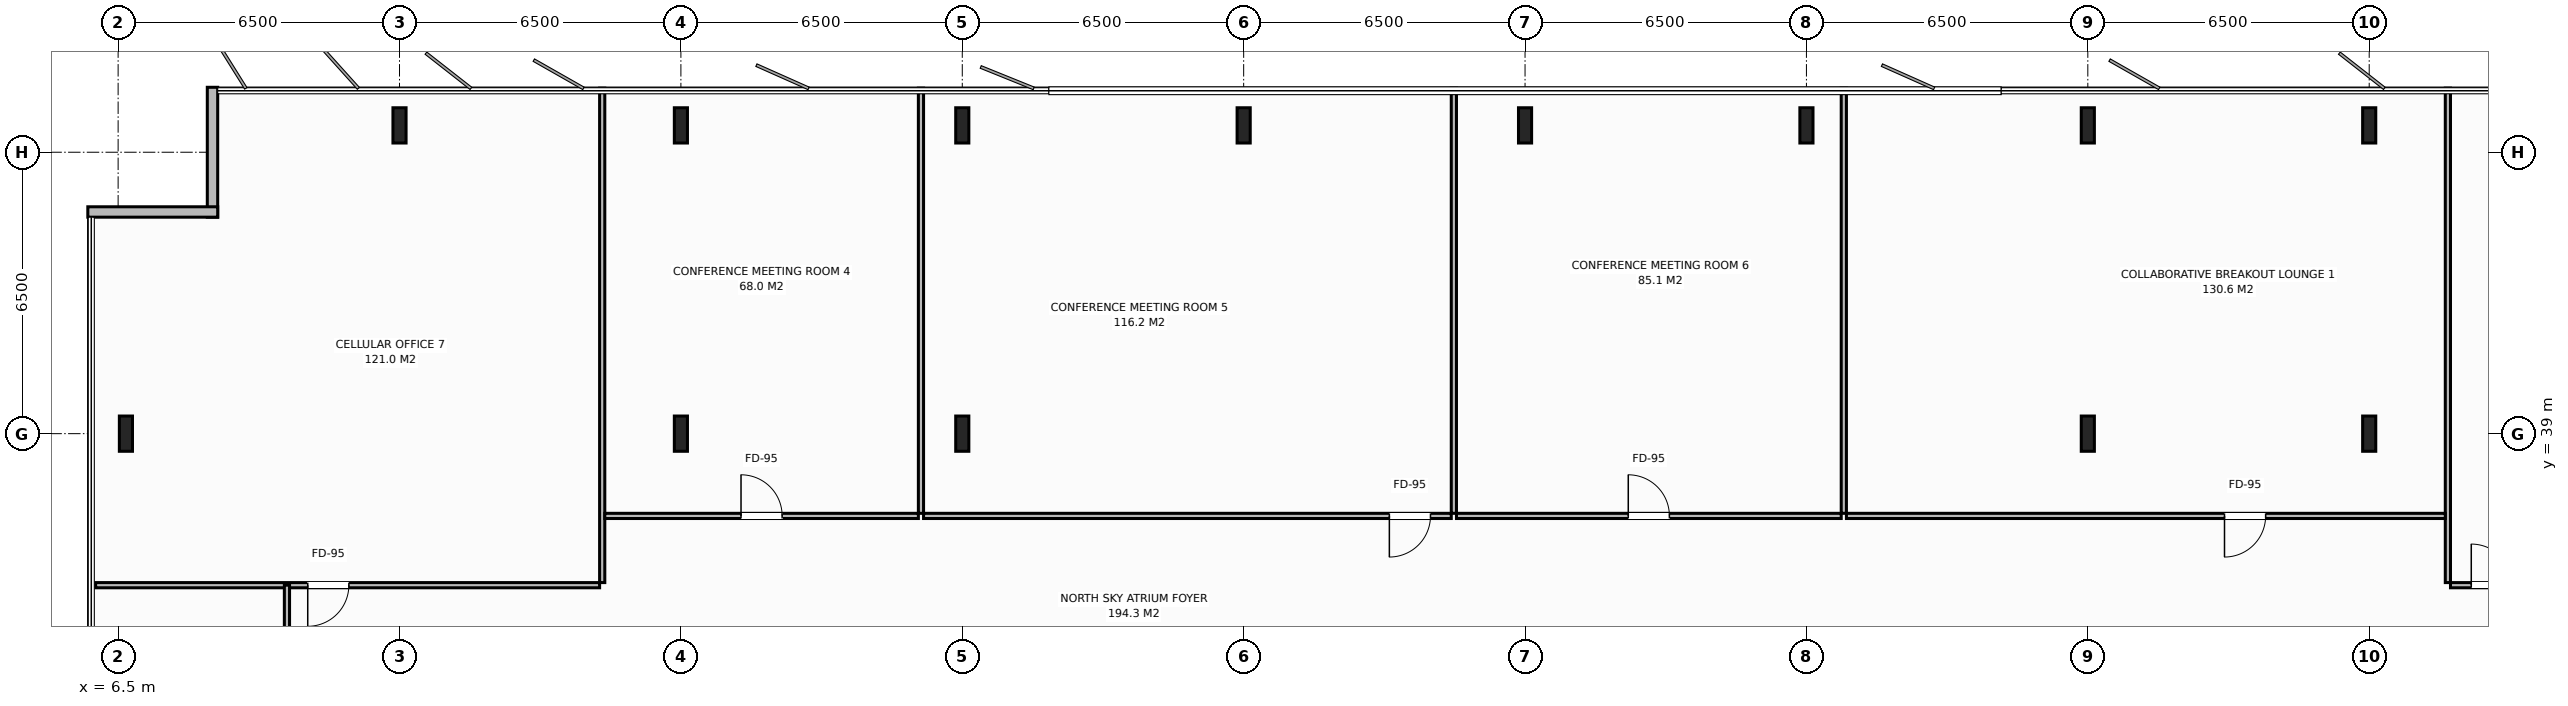
"""IFC4 building model, lengths in metres.
Left out: names, types, materials, properties, quantities, classifications, styles, units other than length and angle.
Written with IfcOpenShell. Run it as: python <this file> out.ifc"""

import sys

from ifc_helpers import new_model, si_unit, direction, frame, frame_2d, origin, origin_2d, place, context, subcontext, project, spatial, rectangle, i_section, extrude, element, fill, save


model = new_model("IFC4")
c1 = context("Model", 3, precision=1e-05, world=origin(), true_north=direction((0.0, 1.0)))
c2 = subcontext(c1, "Body", "Model", "MODEL_VIEW")
j1 = project(units=[si_unit("LENGTHUNIT", "METRE"), si_unit("PLANEANGLEUNIT", "RADIAN")], contexts=[c1])
p1 = place(None, origin())
s1 = spatial("IfcSite", under=j1, at=p1, CompositionType="ELEMENT")
p2 = place(p1, origin())
s2 = spatial("IfcBuilding", under=s1, at=p2, CompositionType="ELEMENT")
p3 = place(p2, frame((0.0, 0.0, 236.6)))
s3 = spatial("IfcBuildingStorey", under=s2, at=p3, CompositionType="ELEMENT", Elevation=236.6)
for number, where, z_axis, x_axis in (
    (1, (19.5, 39.0, 0.0), (0.0, 0.0, 1.0), (1.0, 0.0, 0.0)),
    (2, (58.5, 39.0, 0.0), (0.0, 0.0, 1.0), (1.0, 0.0, 0.0)),
    (3, (26.0, 39.0, 0.0), (0.0, 0.0, 1.0), (1.0, 0.0, 0.0)),
    (4, (52.0, 39.0, 0.0), (0.0, 0.0, 1.0), (1.0, 0.0, 0.0)),
    (5, (13.0, 46.12, 0.0), (0.0, 0.0, 1.0), (1.0, 0.0, 0.0)),
    (6, (19.5, 46.12, 0.0), (0.0, 0.0, 1.0), (1.0, 0.0, 0.0)),
    (7, (26.0, 46.12, 0.0), (0.0, 0.0, 1.0), (1.0, 0.0, 0.0)),
    (8, (32.5, 46.12, 0.0), (0.0, 0.0, 1.0), (1.0, 0.0, 0.0)),
    (9, (39.0, 46.12, 0.0), (0.0, 0.0, 1.0), (1.0, 0.0, 0.0)),
    (10, (45.5, 46.12, 0.0), (0.0, 0.0, 1.0), (1.0, 0.0, 0.0)),
    (11, (52.0, 46.12, 0.0), (0.0, 0.0, 1.0), (1.0, 0.0, 0.0)),
    (12, (58.5, 46.12, 0.0), (0.0, 0.0, 1.0), (1.0, 0.0, 0.0)),
    (13, (6.68, 39.0, 0.0), (0.0, 0.0, 1.0), (1.0, 0.0, 0.0)),
):
    element("IfcColumn", number, at=place(p3, frame(where, z_axis=z_axis, x_axis=x_axis)), inside=s3, PredefinedType="COLUMN", context=c2, shape_type="SweptSolid", body=[
        extrude(i_section(OverallWidth=0.303, OverallDepth=0.814, WebThickness=0.021, FlangeThickness=0.04, at=origin_2d()), origin(), (0.0, 0.0, 1.0), 3.8),
    ])
for number, where, z_axis, x_axis in (
    (14, (8.68, 44.0, 0.0), (0.0, 0.0, 1.0), (0.0, 1.0, 0.0)),
    (15, (5.8, 44.12, 0.0), (0.0, 0.0, 1.0), (1.0, 0.0, 0.0)),
):
    element("IfcWall", number, at=place(p3, frame(where, z_axis=z_axis, x_axis=x_axis)), inside=s3, PredefinedType="STANDARD", context=c2, shape_type="SweptSolid", body=[
        extrude(rectangle(XDim=3.0, YDim=0.24, at=frame_2d((1.5, 0.0))), origin(), (0.0, 0.0, 1.0), 3.58),
    ])
p4 = place(p3, frame((17.682, 35.56, 0.0), z_axis=(0.0, 0.0, 1.0), x_axis=(0.0, 1.0, 0.0)))
e16 = element("IfcWall", 16, at=p4, inside=s3, PredefinedType="PARTITIONING", context=c2, shape_type="SweptSolid", body=[
    extrude(rectangle(XDim=11.42, YDim=0.12, at=frame_2d((5.71, 0.0))), origin(), (0.0, 0.0, 1.0), 3.58),
])
p5 = place(p3, frame((5.98, 35.5, 0.0), z_axis=(0.0, 0.0, 1.0), x_axis=(1.0, 0.0, 0.0)))
e17 = element("IfcWall", 17, at=p5, inside=s3, PredefinedType="PARTITIONING", context=c2, shape_type="SweptSolid", body=[
    extrude(rectangle(XDim=11.642, YDim=0.12, at=frame_2d((5.821, 0.0))), origin(), (0.0, 0.0, 1.0), 3.58),
])
p6 = place(p5, frame((4.9, 0.0, 0.0)))
e18 = element("IfcOpeningElement", 18, at=p6, cuts=e17, PredefinedType="OPENING", context=c2, shape_type="SweptSolid", body=[
    extrude(rectangle(XDim=0.95, YDim=2.15, at=frame_2d((0.475, 1.075))), frame((0.0, 0.07, 0.0), z_axis=(0.0, -1.0, 0.0), x_axis=(1.0, 0.0, 0.0)), (0.0, 0.0, 1.0), 0.14),
])
p7 = place(p3, frame((25.046, 37.16, 0.0), z_axis=(0.0, 0.0, 1.0), x_axis=(0.0, 1.0, 0.0)))
e19 = element("IfcWall", 19, at=p7, inside=s3, PredefinedType="PARTITIONING", context=c2, shape_type="SweptSolid", body=[
    extrude(rectangle(XDim=9.82, YDim=0.12, at=frame_2d((4.91, 0.0))), origin(), (0.0, 0.0, 1.0), 3.58),
])
p8 = place(p3, frame((17.742, 37.1, 0.0), z_axis=(0.0, 0.0, 1.0), x_axis=(1.0, 0.0, 0.0)))
e20 = element("IfcWall", 20, at=p8, inside=s3, PredefinedType="PARTITIONING", context=c2, shape_type="SweptSolid", body=[
    extrude(rectangle(XDim=7.243, YDim=0.12, at=frame_2d((3.622, 0.0))), origin(), (0.0, 0.0, 1.0), 3.58),
])
p9 = place(p8, frame((3.147, 0.0, 0.0)))
e21 = element("IfcOpeningElement", 21, at=p9, cuts=e20, PredefinedType="OPENING", context=c2, shape_type="SweptSolid", body=[
    extrude(rectangle(XDim=0.95, YDim=2.15, at=frame_2d((0.475, 1.075))), frame((0.0, 0.07, 0.0), z_axis=(0.0, -1.0, 0.0), x_axis=(1.0, 0.0, 0.0)), (0.0, 0.0, 1.0), 0.14),
])
p10 = place(p3, frame((37.356, 37.16, 0.0), z_axis=(0.0, 0.0, 1.0), x_axis=(0.0, 1.0, 0.0)))
e22 = element("IfcWall", 22, at=p10, inside=s3, PredefinedType="PARTITIONING", context=c2, shape_type="SweptSolid", body=[
    extrude(rectangle(XDim=9.82, YDim=0.12, at=frame_2d((4.91, 0.0))), origin(), (0.0, 0.0, 1.0), 3.58),
])
p11 = place(p3, frame((25.106, 37.1, 0.0), z_axis=(0.0, 0.0, 1.0), x_axis=(1.0, 0.0, 0.0)))
e23 = element("IfcWall", 23, at=p11, inside=s3, PredefinedType="PARTITIONING", context=c2, shape_type="SweptSolid", body=[
    extrude(rectangle(XDim=12.19, YDim=0.12, at=frame_2d((6.095, 0.0))), origin(), (0.0, 0.0, 1.0), 3.58),
])
p12 = place(p11, frame((10.76, 0.0, 0.0)))
e24 = element("IfcOpeningElement", 24, at=p12, cuts=e23, PredefinedType="OPENING", context=c2, shape_type="SweptSolid", body=[
    extrude(rectangle(XDim=0.95, YDim=2.15, at=frame_2d((0.475, 1.075))), frame((0.0, 0.07, 0.0), z_axis=(0.0, -1.0, 0.0), x_axis=(1.0, 0.0, 0.0)), (0.0, 0.0, 1.0), 0.14),
])
p13 = place(p3, frame((46.364, 37.16, 0.0), z_axis=(0.0, 0.0, 1.0), x_axis=(0.0, 1.0, 0.0)))
e25 = element("IfcWall", 25, at=p13, inside=s3, PredefinedType="PARTITIONING", context=c2, shape_type="SweptSolid", body=[
    extrude(rectangle(XDim=9.82, YDim=0.12, at=frame_2d((4.91, 0.0))), origin(), (0.0, 0.0, 1.0), 3.58),
])
p14 = place(p3, frame((37.416, 37.1, 0.0), z_axis=(0.0, 0.0, 1.0), x_axis=(1.0, 0.0, 0.0)))
e26 = element("IfcWall", 26, at=p14, inside=s3, PredefinedType="PARTITIONING", context=c2, shape_type="SweptSolid", body=[
    extrude(rectangle(XDim=8.888, YDim=0.12, at=frame_2d((4.444, 0.0))), origin(), (0.0, 0.0, 1.0), 3.58),
])
p15 = place(p14, frame((3.969, 0.0, 0.0)))
e27 = element("IfcOpeningElement", 27, at=p15, cuts=e26, PredefinedType="OPENING", context=c2, shape_type="SweptSolid", body=[
    extrude(rectangle(XDim=0.95, YDim=2.15, at=frame_2d((0.475, 1.075))), frame((0.0, 0.07, 0.0), z_axis=(0.0, -1.0, 0.0), x_axis=(1.0, 0.0, 0.0)), (0.0, 0.0, 1.0), 0.14),
])
p16 = place(p3, frame((60.318, 35.56, 0.0), z_axis=(0.0, 0.0, 1.0), x_axis=(0.0, 1.0, 0.0)))
e28 = element("IfcWall", 28, at=p16, inside=s3, PredefinedType="PARTITIONING", context=c2, shape_type="SweptSolid", body=[
    extrude(rectangle(XDim=11.42, YDim=0.12, at=frame_2d((5.71, 0.0))), origin(), (0.0, 0.0, 1.0), 3.58),
])
p17 = place(p3, frame((46.424, 37.1, 0.0), z_axis=(0.0, 0.0, 1.0), x_axis=(1.0, 0.0, 0.0)))
e29 = element("IfcWall", 29, at=p17, inside=s3, PredefinedType="PARTITIONING", context=c2, shape_type="SweptSolid", body=[
    extrude(rectangle(XDim=13.834, YDim=0.12, at=frame_2d((6.917, 0.0))), origin(), (0.0, 0.0, 1.0), 3.58),
])
p18 = place(p17, frame((8.734, 0.0, 0.0)))
e30 = element("IfcOpeningElement", 30, at=p18, cuts=e29, PredefinedType="OPENING", context=c2, shape_type="SweptSolid", body=[
    extrude(rectangle(XDim=0.95, YDim=2.15, at=frame_2d((0.475, 1.075))), frame((0.0, 0.07, 0.0), z_axis=(0.0, -1.0, 0.0), x_axis=(1.0, 0.0, 0.0)), (0.0, 0.0, 1.0), 0.14),
])
p19 = place(p3, frame((60.378, 35.5, 0.0), z_axis=(0.0, 0.0, 1.0), x_axis=(1.0, 0.0, 0.0)))
e31 = element("IfcWall", 31, at=p19, inside=s3, PredefinedType="PARTITIONING", context=c2, shape_type="SweptSolid", body=[
    extrude(rectangle(XDim=11.642, YDim=0.12, at=frame_2d((5.821, 0.0))), origin(), (0.0, 0.0, 1.0), 3.58),
])
p20 = place(p19, frame((0.48, 0.0, 0.0)))
e32 = element("IfcOpeningElement", 32, at=p20, cuts=e31, PredefinedType="OPENING", context=c2, shape_type="SweptSolid", body=[
    extrude(rectangle(XDim=0.95, YDim=2.15, at=frame_2d((0.475, 1.075))), frame((0.0, 0.07, 0.0), z_axis=(0.0, -1.0, 0.0), x_axis=(1.0, 0.0, 0.0)), (0.0, 0.0, 1.0), 0.14),
])
p21 = place(p3, frame((10.4, 16.5, 0.0), z_axis=(0.0, 0.0, 1.0), x_axis=(0.0, 1.0, 0.0)))
e33 = element("IfcWall", 33, at=p21, inside=s3, PredefinedType="PARTITIONING", context=c2, shape_type="SweptSolid", body=[
    extrude(rectangle(XDim=19.0, YDim=0.12, at=frame_2d((9.5, 0.0))), origin(), (0.0, 0.0, 1.0), 3.58),
])
p22 = place(p21, frame((9.025, 0.0, 0.0)))
e34 = element("IfcOpeningElement", 34, at=p22, cuts=e33, PredefinedType="OPENING", context=c2, shape_type="SweptSolid", body=[
    extrude(rectangle(XDim=0.95, YDim=2.15, at=frame_2d((0.475, 1.075))), frame((0.0, 0.07, 0.0), z_axis=(0.0, -1.0, 0.0), x_axis=(1.0, 0.0, 0.0)), (0.0, 0.0, 1.0), 0.14),
])
p23 = place(p6, origin())
e35 = element("IfcDoor", 35, at=p23, inside=s3, OperationType="SINGLE_SWING_RIGHT", PredefinedType="DOOR", context=c2, shape_type="SweptSolid", body=[
    extrude(rectangle(XDim=0.95, YDim=2.15, at=frame_2d((0.475, 1.075))), frame((0.0, 0.025, 0.0), z_axis=(0.0, -1.0, 0.0), x_axis=(1.0, 0.0, 0.0)), (0.0, 0.0, 1.0), 0.05),
])
fill(e18, e35)
p24 = place(p9, origin())
e36 = element("IfcDoor", 36, at=p24, inside=s3, OperationType="SINGLE_SWING_LEFT", PredefinedType="DOOR", context=c2, shape_type="SweptSolid", body=[
    extrude(rectangle(XDim=0.95, YDim=2.15, at=frame_2d((0.475, 1.075))), frame((0.0, 0.025, 0.0), z_axis=(0.0, -1.0, 0.0), x_axis=(1.0, 0.0, 0.0)), (0.0, 0.0, 1.0), 0.05),
])
fill(e21, e36)
p25 = place(p12, origin())
e37 = element("IfcDoor", 37, at=p25, inside=s3, OperationType="SINGLE_SWING_RIGHT", PredefinedType="DOOR", context=c2, shape_type="SweptSolid", body=[
    extrude(rectangle(XDim=0.95, YDim=2.15, at=frame_2d((0.475, 1.075))), frame((0.0, 0.025, 0.0), z_axis=(0.0, -1.0, 0.0), x_axis=(1.0, 0.0, 0.0)), (0.0, 0.0, 1.0), 0.05),
])
fill(e24, e37)
p26 = place(p15, origin())
e38 = element("IfcDoor", 38, at=p26, inside=s3, OperationType="SINGLE_SWING_LEFT", PredefinedType="DOOR", context=c2, shape_type="SweptSolid", body=[
    extrude(rectangle(XDim=0.95, YDim=2.15, at=frame_2d((0.475, 1.075))), frame((0.0, 0.025, 0.0), z_axis=(0.0, -1.0, 0.0), x_axis=(1.0, 0.0, 0.0)), (0.0, 0.0, 1.0), 0.05),
])
fill(e27, e38)
p27 = place(p18, origin())
e39 = element("IfcDoor", 39, at=p27, inside=s3, OperationType="SINGLE_SWING_RIGHT", PredefinedType="DOOR", context=c2, shape_type="SweptSolid", body=[
    extrude(rectangle(XDim=0.95, YDim=2.15, at=frame_2d((0.475, 1.075))), frame((0.0, 0.025, 0.0), z_axis=(0.0, -1.0, 0.0), x_axis=(1.0, 0.0, 0.0)), (0.0, 0.0, 1.0), 0.05),
])
fill(e30, e39)
p28 = place(p20, origin())
e40 = element("IfcDoor", 40, at=p28, inside=s3, OperationType="SINGLE_SWING_LEFT", PredefinedType="DOOR", context=c2, shape_type="SweptSolid", body=[
    extrude(rectangle(XDim=0.95, YDim=2.15, at=frame_2d((0.475, 1.075))), frame((0.0, 0.025, 0.0), z_axis=(0.0, -1.0, 0.0), x_axis=(1.0, 0.0, 0.0)), (0.0, 0.0, 1.0), 0.05),
])
fill(e32, e40)
save(model, sys.argv[1])
